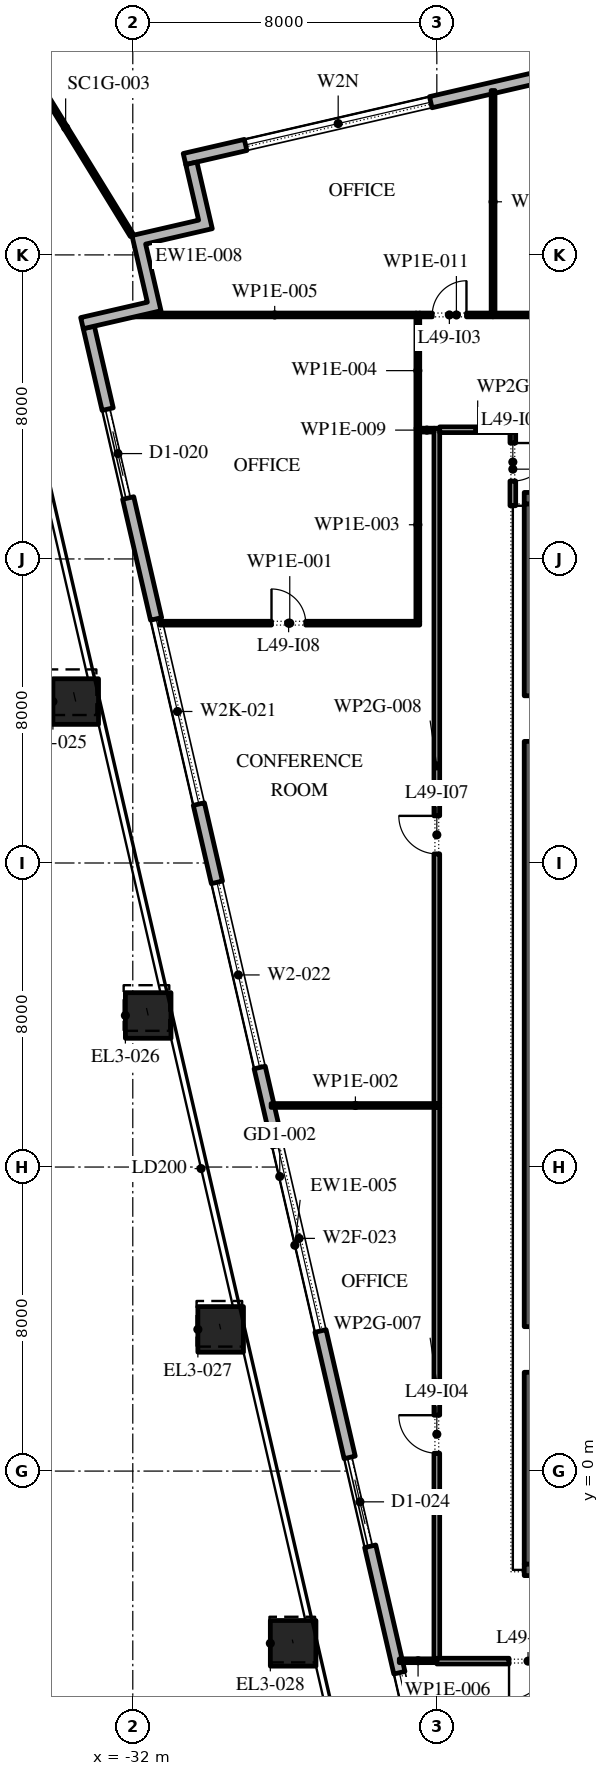
"""IFC4 building model, lengths in metres.
Left out: names, types, materials, properties, quantities, classifications, styles, units other than length and angle.
Written with IfcOpenShell. Run it as: python <this file> out.ifc"""

import sys

from ifc_helpers import new_model, si_unit, direction, frame, frame_2d, origin, origin_2d, place, context, subcontext, project, spatial, polyline, rectangle, outline, extrude, element, fill, save


model = new_model("IFC4")
c1 = context("Model", 3, precision=1e-05, world=origin(), true_north=direction((0.0, 1.0)))
c2 = subcontext(c1, "Body", "Model", "MODEL_VIEW")
j1 = project(units=[si_unit("LENGTHUNIT", "METRE"), si_unit("PLANEANGLEUNIT", "RADIAN")], contexts=[c1])
p1 = place(None, origin())
s1 = spatial("IfcSite", under=j1, at=p1, CompositionType="ELEMENT")
p2 = place(p1, origin())
s2 = spatial("IfcBuilding", under=s1, at=p2, CompositionType="ELEMENT")
p3 = place(p2, frame((0.0, 0.0, 222.0)))
s3 = spatial("IfcBuildingStorey", under=s2, at=p3, CompositionType="ELEMENT", Elevation=222.0)
p4 = place(p3, frame((-33.501, 20.248, 0.0), z_axis=(-0.013461799865, 0.058373149415, 0.998204064995), x_axis=(-0.974423835271, -0.224718021653, 0.0)))
e1 = element("IfcColumn", 1, at=p4, inside=s3, PredefinedType="COLUMN", context=c2, shape_type="SweptSolid", body=[
    extrude(rectangle(XDim=1.2, YDim=1.2, at=origin_2d()), origin(), (0.0, 0.0, 1.0), 4.208),
])
p5 = place(p3, frame((-31.594, 11.988, 0.0), z_axis=(-0.010799619665, 0.046740289408, 0.998848694028), x_axis=(-0.974329962248, -0.225124686929, 0.0)))
e2 = element("IfcColumn", 2, at=p5, inside=s3, PredefinedType="COLUMN", context=c2, shape_type="SweptSolid", body=[
    extrude(rectangle(XDim=1.2, YDim=1.2, at=origin_2d()), origin(), (0.0, 0.0, 1.0), 4.205),
])
p6 = place(p3, frame((-29.688, 3.728, 0.0), z_axis=(-0.008132835078, 0.035087374195, 0.999351156084), x_axis=(-0.97417327444, -0.225801752354, 0.0)))
e3 = element("IfcColumn", 3, at=p6, inside=s3, PredefinedType="COLUMN", context=c2, shape_type="SweptSolid", body=[
    extrude(rectangle(XDim=1.2, YDim=1.2, at=origin_2d()), origin(), (0.0, 0.0, 1.0), 4.203),
])
p7 = place(p3, frame((-27.781, -4.532, 0.0), z_axis=(-0.005404472139, 0.023419379268, 0.999711120452), x_axis=(-0.974391195695, -0.224859506699, 0.0)))
e4 = element("IfcColumn", 4, at=p7, inside=s3, PredefinedType="COLUMN", context=c2, shape_type="SweptSolid", body=[
    extrude(rectangle(XDim=1.2, YDim=1.2, at=origin_2d()), origin(), (0.0, 0.0, 1.0), 4.201),
])
p8 = place(p3, frame((17.592, 45.657, 0.0), z_axis=(0.0, 0.0, 1.0), x_axis=(-0.974370243697, -0.224950279389, 0.0)))
e5 = element("IfcWall", 5, at=p8, inside=s3, PredefinedType="STANDARD", context=c2, shape_type="SweptSolid", body=[
    extrude(rectangle(XDim=49.5, YDim=0.3, at=frame_2d((24.75, 0.0))), origin(), (0.0, 0.0, 1.0), 3.75),
])
p9 = place(p8, frame((3.6, 0.0, 0.0)))
e6 = element("IfcOpeningElement", 6, at=p9, cuts=e5, PredefinedType="OPENING", context=c2, shape_type="SweptSolid", body=[
    extrude(rectangle(XDim=2.4, YDim=3.5, at=frame_2d((1.2, 1.75))), frame((0.0, 0.16, 0.0), z_axis=(0.0, -1.0, 0.0), x_axis=(1.0, 0.0, 0.0)), (0.0, 0.0, 1.0), 0.32),
])
p10 = place(p8, frame((9.65, 0.0, 0.45)))
e7 = element("IfcOpeningElement", 7, at=p10, cuts=e5, PredefinedType="OPENING", context=c2, shape_type="SweptSolid", body=[
    extrude(rectangle(XDim=5.0, YDim=2.2, at=frame_2d((2.5, 1.1))), frame((0.0, 0.16, 0.0), z_axis=(0.0, -1.0, 0.0), x_axis=(1.0, 0.0, 0.0)), (0.0, 0.0, 1.0), 0.32),
])
p11 = place(p8, frame((17.95, 0.0, 0.45)))
e8 = element("IfcOpeningElement", 8, at=p11, cuts=e5, PredefinedType="OPENING", context=c2, shape_type="SweptSolid", body=[
    extrude(rectangle(XDim=5.0, YDim=2.2, at=frame_2d((2.5, 1.1))), frame((0.0, 0.16, 0.0), z_axis=(0.0, -1.0, 0.0), x_axis=(1.0, 0.0, 0.0)), (0.0, 0.0, 1.0), 0.32),
])
p12 = place(p8, frame((26.25, 0.0, 0.45)))
e9 = element("IfcOpeningElement", 9, at=p12, cuts=e5, PredefinedType="OPENING", context=c2, shape_type="SweptSolid", body=[
    extrude(rectangle(XDim=5.0, YDim=2.2, at=frame_2d((2.5, 1.1))), frame((0.0, 0.16, 0.0), z_axis=(0.0, -1.0, 0.0), x_axis=(1.0, 0.0, 0.0)), (0.0, 0.0, 1.0), 0.32),
])
p13 = place(p8, frame((35.85, 0.0, 0.0)))
e10 = element("IfcOpeningElement", 10, at=p13, cuts=e5, PredefinedType="OPENING", context=c2, shape_type="SweptSolid", body=[
    extrude(rectangle(XDim=2.4, YDim=2.7, at=frame_2d((1.2, 1.35))), frame((0.0, 0.16, 0.0), z_axis=(0.0, -1.0, 0.0), x_axis=(1.0, 0.0, 0.0)), (0.0, 0.0, 1.0), 0.32),
])
p14 = place(p8, frame((42.85, 0.0, 0.45)))
e11 = element("IfcOpeningElement", 11, at=p14, cuts=e5, PredefinedType="OPENING", context=c2, shape_type="SweptSolid", body=[
    extrude(rectangle(XDim=5.0, YDim=2.275, at=frame_2d((2.5, 1.137))), frame((0.0, 0.16, 0.0), z_axis=(0.0, -1.0, 0.0), x_axis=(1.0, 0.0, 0.0)), (0.0, 0.0, 1.0), 0.32),
])
p15 = place(p3, frame((-33.157, 30.092, 0.0), z_axis=(0.0, 0.0, 1.0), x_axis=(0.224950279389, -0.974370243697, 0.0)))
e12 = element("IfcWall", 12, at=p15, inside=s3, PredefinedType="STANDARD", context=c2, shape_type="SweptSolid", body=[
    extrude(rectangle(XDim=49.5, YDim=0.3, at=frame_2d((24.75, 0.0))), origin(), (0.0, 0.0, 1.0), 3.75),
])
p16 = place(p15, frame((2.207, 0.0, 0.0)))
e13 = element("IfcOpeningElement", 13, at=p16, cuts=e12, PredefinedType="OPENING", context=c2, shape_type="SweptSolid", body=[
    extrude(rectangle(XDim=2.4, YDim=3.5, at=frame_2d((1.2, 1.75))), frame((0.0, 0.16, 0.0), z_axis=(0.0, -1.0, 0.0), x_axis=(1.0, 0.0, 0.0)), (0.0, 0.0, 1.0), 0.32),
])
p17 = place(p15, frame((7.871, 0.0, 0.45)))
e14 = element("IfcOpeningElement", 14, at=p17, cuts=e12, PredefinedType="OPENING", context=c2, shape_type="SweptSolid", body=[
    extrude(rectangle(XDim=5.0, YDim=2.575, at=frame_2d((2.5, 1.288))), frame((0.0, 0.16, 0.0), z_axis=(0.0, -1.0, 0.0), x_axis=(1.0, 0.0, 0.0)), (0.0, 0.0, 1.0), 0.32),
])
p18 = place(p15, frame((14.986, 0.0, 0.45)))
e15 = element("IfcOpeningElement", 15, at=p18, cuts=e12, PredefinedType="OPENING", context=c2, shape_type="SweptSolid", body=[
    extrude(rectangle(XDim=5.0, YDim=3.25, at=frame_2d((2.5, 1.625))), frame((0.0, 0.16, 0.0), z_axis=(0.0, -1.0, 0.0), x_axis=(1.0, 0.0, 0.0)), (0.0, 0.0, 1.0), 0.32),
])
p19 = place(p15, frame((22.1, 0.0, 0.45)))
e16 = element("IfcOpeningElement", 16, at=p19, cuts=e12, PredefinedType="OPENING", context=c2, shape_type="SweptSolid", body=[
    extrude(rectangle(XDim=5.0, YDim=2.75, at=frame_2d((2.5, 1.375))), frame((0.0, 0.16, 0.0), z_axis=(0.0, -1.0, 0.0), x_axis=(1.0, 0.0, 0.0)), (0.0, 0.0, 1.0), 0.32),
])
p20 = place(p15, frame((30.514, 0.0, 0.0)))
e17 = element("IfcOpeningElement", 17, at=p20, cuts=e12, PredefinedType="OPENING", context=c2, shape_type="SweptSolid", body=[
    extrude(rectangle(XDim=2.4, YDim=3.5, at=frame_2d((1.2, 1.75))), frame((0.0, 0.16, 0.0), z_axis=(0.0, -1.0, 0.0), x_axis=(1.0, 0.0, 0.0)), (0.0, 0.0, 1.0), 0.32),
])
p21 = place(p15, frame((36.329, 0.0, 0.45)))
e18 = element("IfcOpeningElement", 18, at=p21, cuts=e12, PredefinedType="OPENING", context=c2, shape_type="SweptSolid", body=[
    extrude(rectangle(XDim=5.0, YDim=3.25, at=frame_2d((2.5, 1.625))), frame((0.0, 0.16, 0.0), z_axis=(0.0, -1.0, 0.0), x_axis=(1.0, 0.0, 0.0)), (0.0, 0.0, 1.0), 0.32),
])
p22 = place(p15, frame((43.443, 0.0, 0.45)))
e19 = element("IfcOpeningElement", 19, at=p22, cuts=e12, PredefinedType="OPENING", context=c2, shape_type="SweptSolid", body=[
    extrude(rectangle(XDim=5.0, YDim=3.25, at=frame_2d((2.5, 1.625))), frame((0.0, 0.16, 0.0), z_axis=(0.0, -1.0, 0.0), x_axis=(1.0, 0.0, 0.0)), (0.0, 0.0, 1.0), 0.32),
])
p23 = place(p3, origin())
e20 = element("IfcWall", 20, at=p23, inside=s3, PredefinedType="STANDARD", context=c2, shape_type="SweptSolid", body=[
    extrude(outline(polyline([(-31.617, 30.756), (-32.022, 32.51), (-30.268, 32.914), (-30.605, 34.376), (-30.313, 34.443), (-29.908, 32.69), (-31.662, 32.285), (-31.257, 30.531), (-33.303, 30.058), (-33.371, 30.351), (-31.617, 30.756)])), origin(), (0.0, 0.0, 1.0), 3.75),
])
p24 = place(p3, frame((-32.022, 32.51, -0.05), z_axis=(0.0, 0.0, 1.0), x_axis=(-0.523700799975, 0.851902266757, 0.0)))
e21 = element("IfcWall", 21, at=p24, inside=s3, PredefinedType="STANDARD", context=c2, shape_type="SweptSolid", body=[
    extrude(rectangle(XDim=6.664, YDim=0.1, at=frame_2d((3.332, 0.0))), origin(), (0.0, 0.0, 1.0), 3.8),
])
p25 = place(p3, frame((-21.35, -2.45, 0.0), z_axis=(0.0, 0.0, 1.0), x_axis=(0.0, 1.0, 0.0)))
e22 = element("IfcWall", 22, at=p25, inside=s3, PredefinedType="SHEAR", context=c2, shape_type="SweptSolid", body=[
    extrude(rectangle(XDim=27.9, YDim=0.7, at=frame_2d((13.95, 0.0))), origin(), (0.0, 0.0, 1.0), 3.75),
])
p26 = place(p25, frame((5.05, 0.0, 0.0)))
e23 = element("IfcOpeningElement", 23, at=p26, cuts=e22, PredefinedType="OPENING", context=c2, shape_type="SweptSolid", body=[
    extrude(rectangle(XDim=1.2, YDim=2.1, at=frame_2d((0.6, 1.05))), frame((0.0, 0.36, 0.0), z_axis=(0.0, -1.0, 0.0), x_axis=(1.0, 0.0, 0.0)), (0.0, 0.0, 1.0), 0.72),
])
p27 = place(p25, frame((21.65, 0.0, 0.0)))
e24 = element("IfcOpeningElement", 24, at=p27, cuts=e22, PredefinedType="OPENING", context=c2, shape_type="SweptSolid", body=[
    extrude(rectangle(XDim=1.2, YDim=2.1, at=frame_2d((0.6, 1.05))), frame((0.0, 0.36, 0.0), z_axis=(0.0, -1.0, 0.0), x_axis=(1.0, 0.0, 0.0)), (0.0, 0.0, 1.0), 0.72),
])
for number, where, z_axis, x_axis in (
    (25, (-21.7, -2.6, 0.0), (0.0, 0.0, 1.0), (1.0, 0.0, 0.0)),
    (26, (-21.7, 25.6, 0.0), (0.0, 0.0, 1.0), (1.0, 0.0, 0.0)),
):
    element("IfcWall", number, at=place(p3, frame(where, z_axis=z_axis, x_axis=x_axis)), inside=s3, PredefinedType="SHEAR", context=c2, shape_type="SweptSolid", body=[
        extrude(rectangle(XDim=11.4, YDim=0.3, at=frame_2d((5.7, 0.0))), origin(), (0.0, 0.0, 1.0), 3.75),
    ])
p28 = place(p3, frame((-31.289, 22.31, 0.0), z_axis=(0.0, 0.0, 1.0), x_axis=(1.0, 0.0, 0.0)))
e27 = element("IfcWall", 27, at=p28, inside=s3, PredefinedType="PARTITIONING", context=c2, shape_type="SweptSolid", body=[
    extrude(rectangle(XDim=6.839, YDim=0.1, at=frame_2d((3.419, 0.0))), origin(), (0.0, 0.0, 1.0), 3.75),
])
p29 = place(p28, frame((2.939, 0.0, 0.0)))
e28 = element("IfcOpeningElement", 28, at=p29, cuts=e27, PredefinedType="OPENING", context=c2, shape_type="SweptSolid", body=[
    extrude(rectangle(XDim=0.9, YDim=2.1, at=frame_2d((0.45, 1.05))), frame((0.0, 0.06, 0.0), z_axis=(0.0, -1.0, 0.0), x_axis=(1.0, 0.0, 0.0)), (0.0, 0.0, 1.0), 0.12),
])
p30 = place(p3, frame((-28.36, 9.62, 0.0), z_axis=(0.0, 0.0, 1.0), x_axis=(1.0, 0.0, 0.0)))
e29 = element("IfcWall", 29, at=p30, inside=s3, PredefinedType="PARTITIONING", context=c2, shape_type="SweptSolid", body=[
    extrude(rectangle(XDim=4.435, YDim=0.1, at=frame_2d((2.218, 0.0))), origin(), (0.0, 0.0, 1.0), 3.75),
])
p31 = place(p3, frame((-24.5, 22.36, 0.0), z_axis=(0.0, 0.0, 1.0), x_axis=(0.0, 1.0, 0.0)))
e30 = element("IfcWall", 30, at=p31, inside=s3, PredefinedType="PARTITIONING", context=c2, shape_type="SweptSolid", body=[
    extrude(rectangle(XDim=5.08, YDim=0.1, at=frame_2d((2.54, 0.0))), origin(), (0.0, 0.0, 1.0), 3.75),
])
p32 = place(p3, frame((-24.5, 27.44, 0.0), z_axis=(0.0, 0.0, 1.0), x_axis=(0.0, 1.0, 0.0)))
e31 = element("IfcWall", 31, at=p32, inside=s3, PredefinedType="PARTITIONING", context=c2, shape_type="SweptSolid", body=[
    extrude(rectangle(XDim=3.03, YDim=0.1, at=frame_2d((1.515, 0.0))), origin(), (0.0, 0.0, 1.0), 3.75),
])
p33 = place(p3, frame((-24.55, 30.42, 0.0), z_axis=(0.0, 0.0, 1.0), x_axis=(-1.0, 0.0, 0.0)))
e32 = element("IfcWall", 32, at=p33, inside=s3, PredefinedType="PARTITIONING", context=c2, shape_type="SweptSolid", body=[
    extrude(rectangle(XDim=7.432, YDim=0.1, at=frame_2d((3.716, 0.0))), origin(), (0.0, 0.0, 1.0), 3.75),
])
p34 = place(p3, frame((-24.0, -4.99, 0.0), z_axis=(0.0, 0.0, 1.0), x_axis=(-1.0, 0.0, 0.0)))
e33 = element("IfcWall", 33, at=p34, inside=s3, PredefinedType="PARTITIONING", context=c2, shape_type="SweptSolid", body=[
    extrude(rectangle(XDim=0.987, YDim=0.1, at=frame_2d((0.494, 0.0))), origin(), (0.0, 0.0, 1.0), 3.75),
])
p35 = place(p3, frame((-24.0, -4.94, 0.0), z_axis=(0.0, 0.0, 1.0), x_axis=(0.0, 1.0, 0.0)))
e34 = element("IfcWall", 34, at=p35, inside=s3, PredefinedType="PARTITIONING", context=c2, shape_type="SweptSolid", body=[
    extrude(rectangle(XDim=14.51, YDim=0.15, at=frame_2d((7.255, 0.0))), origin(), (0.0, 0.0, 1.0), 3.75),
])
p36 = place(p35, frame((5.41, 0.0, 0.0)))
e35 = element("IfcOpeningElement", 35, at=p36, cuts=e34, PredefinedType="OPENING", context=c2, shape_type="SweptSolid", body=[
    extrude(rectangle(XDim=1.0, YDim=2.1, at=frame_2d((0.5, 1.05))), frame((0.0, 0.085, 0.0), z_axis=(0.0, -1.0, 0.0), x_axis=(1.0, 0.0, 0.0)), (0.0, 0.0, 1.0), 0.17),
])
p37 = place(p3, frame((-24.0, 9.67, 0.0), z_axis=(0.0, 0.0, 1.0), x_axis=(0.0, 1.0, 0.0)))
e36 = element("IfcWall", 36, at=p37, inside=s3, PredefinedType="PARTITIONING", context=c2, shape_type="SweptSolid", body=[
    extrude(rectangle(XDim=17.77, YDim=0.15, at=frame_2d((8.885, 0.0))), origin(), (0.0, 0.0, 1.0), 3.75),
])
p38 = place(p37, frame((6.57, 0.0, 0.0)))
e37 = element("IfcOpeningElement", 37, at=p38, cuts=e36, PredefinedType="OPENING", context=c2, shape_type="SweptSolid", body=[
    extrude(rectangle(XDim=1.0, YDim=2.1, at=frame_2d((0.5, 1.05))), frame((0.0, 0.085, 0.0), z_axis=(0.0, -1.0, 0.0), x_axis=(1.0, 0.0, 0.0)), (0.0, 0.0, 1.0), 0.17),
])
p39 = place(p3, frame((-24.075, 27.39, 0.0), z_axis=(0.0, 0.0, 1.0), x_axis=(-1.0, 0.0, 0.0)))
e38 = element("IfcWall", 38, at=p39, inside=s3, PredefinedType="PARTITIONING", context=c2, shape_type="SweptSolid", body=[
    extrude(rectangle(XDim=0.375, YDim=0.1, at=frame_2d((0.188, 0.0))), origin(), (0.0, 0.0, 1.0), 3.75),
])
p40 = place(p3, frame((-23.925, 27.4, 0.0), z_axis=(0.0, 0.0, 1.0), x_axis=(1.0, 0.0, 0.0)))
e39 = element("IfcWall", 39, at=p40, inside=s3, PredefinedType="PARTITIONING", context=c2, shape_type="SweptSolid", body=[
    extrude(rectangle(XDim=2.0, YDim=0.15, at=frame_2d((1.0, 0.0))), origin(), (0.0, 0.0, 1.0), 3.75),
])
p41 = place(p3, frame((-22.52, 30.42, 0.0), z_axis=(0.0, 0.0, 1.0), x_axis=(-1.0, 0.0, 0.0)))
e40 = element("IfcWall", 40, at=p41, inside=s3, PredefinedType="PARTITIONING", context=c2, shape_type="SweptSolid", body=[
    extrude(rectangle(XDim=1.93, YDim=0.1, at=frame_2d((0.965, 0.0))), origin(), (0.0, 0.0, 1.0), 3.75),
])
p42 = place(p41, frame((0.7, 0.0, 0.0)))
e41 = element("IfcOpeningElement", 41, at=p42, cuts=e40, PredefinedType="OPENING", context=c2, shape_type="SweptSolid", body=[
    extrude(rectangle(XDim=0.9, YDim=2.1, at=frame_2d((0.45, 1.05))), frame((0.0, 0.06, 0.0), z_axis=(0.0, -1.0, 0.0), x_axis=(1.0, 0.0, 0.0)), (0.0, 0.0, 1.0), 0.12),
])
p43 = place(p3, frame((-22.52, 30.47, 0.0), z_axis=(0.0, 0.0, 1.0), x_axis=(0.0, 1.0, 0.0)))
e42 = element("IfcWall", 42, at=p43, inside=s3, PredefinedType="PARTITIONING", context=c2, shape_type="SweptSolid", body=[
    extrude(rectangle(XDim=5.855, YDim=0.1, at=frame_2d((2.927, 0.0))), origin(), (0.0, 0.0, 1.0), 3.75),
])
p44 = place(p3, frame((-22.0, 27.325, 0.0), z_axis=(0.0, 0.0, 1.0), x_axis=(0.0, -1.0, 0.0)))
e43 = element("IfcWall", 43, at=p44, inside=s3, PredefinedType="PARTITIONING", context=c2, shape_type="SweptSolid", body=[
    extrude(rectangle(XDim=1.925, YDim=0.15, at=frame_2d((0.962, 0.0))), origin(), (0.0, 0.0, 1.0), 3.75),
])
p45 = place(p44, frame((0.275, 0.0, 0.0)))
e44 = element("IfcOpeningElement", 44, at=p45, cuts=e43, PredefinedType="OPENING", context=c2, shape_type="SweptSolid", body=[
    extrude(rectangle(XDim=1.0, YDim=2.1, at=frame_2d((0.5, 1.05))), frame((0.0, 0.085, 0.0), z_axis=(0.0, -1.0, 0.0), x_axis=(1.0, 0.0, 0.0)), (0.0, 0.0, 1.0), 0.17),
])
p46 = place(p3, frame((-17.97, -5.0, 0.0), z_axis=(0.0, 0.0, 1.0), x_axis=(-1.0, 0.0, 0.0)))
e45 = element("IfcWall", 45, at=p46, inside=s3, PredefinedType="PARTITIONING", context=c2, shape_type="SweptSolid", body=[
    extrude(rectangle(XDim=6.03, YDim=0.15, at=frame_2d((3.015, 0.0))), origin(), (0.0, 0.0, 1.0), 3.75),
])
p47 = place(p46, frame((3.13, 0.0, 0.0)))
e46 = element("IfcOpeningElement", 46, at=p47, cuts=e45, PredefinedType="OPENING", context=c2, shape_type="SweptSolid", body=[
    extrude(rectangle(XDim=1.0, YDim=2.1, at=frame_2d((0.5, 1.05))), frame((0.0, 0.085, 0.0), z_axis=(0.0, -1.0, 0.0), x_axis=(1.0, 0.0, 0.0)), (0.0, 0.0, 1.0), 0.17),
])
p48 = place(p3, frame((-12.55, 30.42, 0.0), z_axis=(0.0, 0.0, 1.0), x_axis=(-1.0, 0.0, 0.0)))
e47 = element("IfcWall", 47, at=p48, inside=s3, PredefinedType="PARTITIONING", context=c2, shape_type="SweptSolid", body=[
    extrude(rectangle(XDim=9.97, YDim=0.1, at=frame_2d((4.985, 0.0))), origin(), (0.0, 0.0, 1.0), 3.75),
])
p49 = place(p48, frame((4.4, 0.0, 0.0)))
e48 = element("IfcOpeningElement", 48, at=p49, cuts=e47, PredefinedType="OPENING", context=c2, shape_type="SweptSolid", body=[
    extrude(rectangle(XDim=0.9, YDim=2.1, at=frame_2d((0.45, 1.05))), frame((0.0, 0.06, 0.0), z_axis=(0.0, -1.0, 0.0), x_axis=(1.0, 0.0, 0.0)), (0.0, 0.0, 1.0), 0.12),
])
p50 = place(p14, origin())
e49 = element("IfcWindow", 49, at=p50, inside=s3, PartitioningType="DOUBLE_PANEL_VERTICAL", PredefinedType="WINDOW", context=c2, shape_type="SweptSolid", body=[
    extrude(rectangle(XDim=5.0, YDim=2.275, at=frame_2d((2.5, 1.137))), frame((0.0, 0.03, 0.0), z_axis=(0.0, -1.0, 0.0), x_axis=(1.0, 0.0, 0.0)), (0.0, 0.0, 1.0), 0.06),
])
fill(e11, e49)
p51 = place(p16, origin())
e50 = element("IfcDoor", 50, at=p51, inside=s3, OperationType="DOUBLE_DOOR_SLIDING", PredefinedType="DOOR", context=c2, shape_type="SweptSolid", body=[
    extrude(rectangle(XDim=2.4, YDim=3.5, at=frame_2d((1.2, 1.75))), frame((0.0, 0.025, 0.0), z_axis=(0.0, -1.0, 0.0), x_axis=(1.0, 0.0, 0.0)), (0.0, 0.0, 1.0), 0.05),
])
fill(e13, e50)
p52 = place(p17, origin())
e51 = element("IfcWindow", 51, at=p52, inside=s3, PartitioningType="DOUBLE_PANEL_VERTICAL", PredefinedType="WINDOW", context=c2, shape_type="SweptSolid", body=[
    extrude(rectangle(XDim=5.0, YDim=2.575, at=frame_2d((2.5, 1.288))), frame((0.0, 0.03, 0.0), z_axis=(0.0, -1.0, 0.0), x_axis=(1.0, 0.0, 0.0)), (0.0, 0.0, 1.0), 0.06),
])
fill(e14, e51)
p53 = place(p18, origin())
e52 = element("IfcWindow", 52, at=p53, inside=s3, PartitioningType="DOUBLE_PANEL_VERTICAL", PredefinedType="WINDOW", context=c2, shape_type="SweptSolid", body=[
    extrude(rectangle(XDim=5.0, YDim=3.25, at=frame_2d((2.5, 1.625))), frame((0.0, 0.03, 0.0), z_axis=(0.0, -1.0, 0.0), x_axis=(1.0, 0.0, 0.0)), (0.0, 0.0, 1.0), 0.06),
])
fill(e15, e52)
p54 = place(p19, origin())
e53 = element("IfcWindow", 53, at=p54, inside=s3, PartitioningType="DOUBLE_PANEL_VERTICAL", PredefinedType="WINDOW", context=c2, shape_type="SweptSolid", body=[
    extrude(rectangle(XDim=5.0, YDim=2.75, at=frame_2d((2.5, 1.375))), frame((0.0, 0.03, 0.0), z_axis=(0.0, -1.0, 0.0), x_axis=(1.0, 0.0, 0.0)), (0.0, 0.0, 1.0), 0.06),
])
fill(e16, e53)
p55 = place(p20, origin())
e54 = element("IfcDoor", 54, at=p55, inside=s3, OperationType="DOUBLE_DOOR_SLIDING", PredefinedType="DOOR", context=c2, shape_type="SweptSolid", body=[
    extrude(rectangle(XDim=2.4, YDim=3.5, at=frame_2d((1.2, 1.75))), frame((0.0, 0.025, 0.0), z_axis=(0.0, -1.0, 0.0), x_axis=(1.0, 0.0, 0.0)), (0.0, 0.0, 1.0), 0.05),
])
fill(e17, e54)
p56 = place(p21, origin())
e55 = element("IfcWindow", 55, at=p56, inside=s3, PartitioningType="DOUBLE_PANEL_VERTICAL", PredefinedType="WINDOW", context=c2, shape_type="SweptSolid", body=[
    extrude(rectangle(XDim=5.0, YDim=3.25, at=frame_2d((2.5, 1.625))), frame((0.0, 0.03, 0.0), z_axis=(0.0, -1.0, 0.0), x_axis=(1.0, 0.0, 0.0)), (0.0, 0.0, 1.0), 0.06),
])
fill(e18, e55)
p57 = place(p42, frame((0.9, 0.0, 0.0), z_axis=(0.0, 0.0, 1.0), x_axis=(-1.0, 0.0, 0.0)))
e56 = element("IfcDoor", 56, at=p57, inside=s3, OperationType="SINGLE_SWING_LEFT", PredefinedType="DOOR", context=c2, shape_type="SweptSolid", body=[
    extrude(rectangle(XDim=0.9, YDim=2.1, at=frame_2d((0.45, 1.05))), frame((0.0, 0.025, 0.0), z_axis=(0.0, -1.0, 0.0), x_axis=(1.0, 0.0, 0.0)), (0.0, 0.0, 1.0), 0.05),
])
fill(e41, e56)
p58 = place(p36, origin())
e57 = element("IfcDoor", 57, at=p58, inside=s3, OperationType="SINGLE_SWING_LEFT", PredefinedType="DOOR", context=c2, shape_type="SweptSolid", body=[
    extrude(rectangle(XDim=1.0, YDim=2.1, at=frame_2d((0.5, 1.05))), frame((0.0, 0.025, 0.0), z_axis=(0.0, -1.0, 0.0), x_axis=(1.0, 0.0, 0.0)), (0.0, 0.0, 1.0), 0.05),
])
fill(e35, e57)
p59 = place(p45, origin())
e58 = element("IfcDoor", 58, at=p59, inside=s3, OperationType="SINGLE_SWING_RIGHT", PredefinedType="DOOR", context=c2, shape_type="SweptSolid", body=[
    extrude(rectangle(XDim=1.0, YDim=2.1, at=frame_2d((0.5, 1.05))), frame((0.0, 0.025, 0.0), z_axis=(0.0, -1.0, 0.0), x_axis=(1.0, 0.0, 0.0)), (0.0, 0.0, 1.0), 0.05),
])
fill(e44, e58)
p60 = place(p38, origin())
e59 = element("IfcDoor", 59, at=p60, inside=s3, OperationType="SINGLE_SWING_LEFT", PredefinedType="DOOR", context=c2, shape_type="SweptSolid", body=[
    extrude(rectangle(XDim=1.0, YDim=2.1, at=frame_2d((0.5, 1.05))), frame((0.0, 0.025, 0.0), z_axis=(0.0, -1.0, 0.0), x_axis=(1.0, 0.0, 0.0)), (0.0, 0.0, 1.0), 0.05),
])
fill(e37, e59)
p61 = place(p29, origin())
e60 = element("IfcDoor", 60, at=p61, inside=s3, OperationType="SINGLE_SWING_RIGHT", PredefinedType="DOOR", context=c2, shape_type="SweptSolid", body=[
    extrude(rectangle(XDim=0.9, YDim=2.1, at=frame_2d((0.45, 1.05))), frame((0.0, 0.025, 0.0), z_axis=(0.0, -1.0, 0.0), x_axis=(1.0, 0.0, 0.0)), (0.0, 0.0, 1.0), 0.05),
])
fill(e28, e60)
p62 = place(p47, origin())
e61 = element("IfcDoor", 61, at=p62, inside=s3, OperationType="SINGLE_SWING_LEFT", PredefinedType="DOOR", context=c2, shape_type="SweptSolid", body=[
    extrude(rectangle(XDim=1.0, YDim=2.1, at=frame_2d((0.5, 1.05))), frame((0.0, 0.025, 0.0), z_axis=(0.0, -1.0, 0.0), x_axis=(1.0, 0.0, 0.0)), (0.0, 0.0, 1.0), 0.05),
])
fill(e46, e61)
save(model, sys.argv[1])
